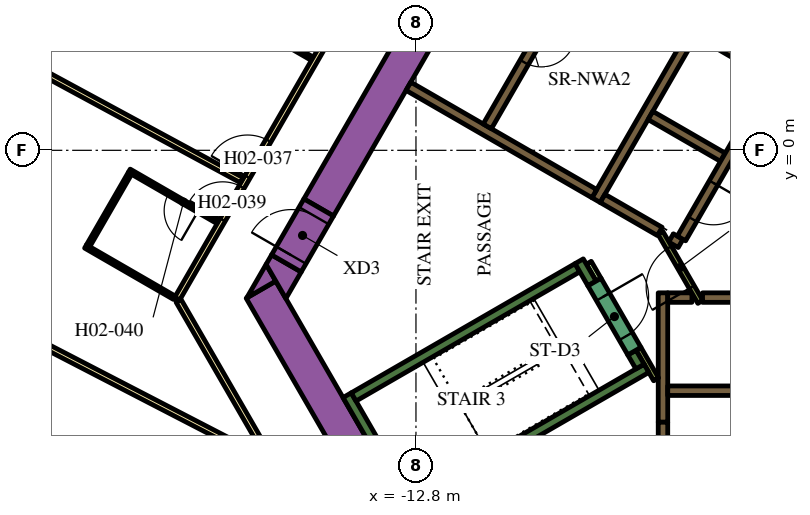
"""IFC4 building model, lengths in metres.
Left out: names, types, materials, properties, quantities, classifications, styles, units other than length and angle.
Written with IfcOpenShell. Run it as: python <this file> out.ifc"""

import sys

from ifc_helpers import new_model, si_unit, direction, frame, frame_2d, origin, place, context, subcontext, project, spatial, polyline, rectangle, outline, extrude, element, fill, save


model = new_model("IFC4")
c1 = context("Model", 3, precision=1e-05, world=origin(), true_north=direction((0.0, 1.0)))
c2 = subcontext(c1, "Body", "Model", "MODEL_VIEW")
j1 = project(units=[si_unit("LENGTHUNIT", "METRE"), si_unit("PLANEANGLEUNIT", "RADIAN")], contexts=[c1])
p1 = place(None, origin())
s1 = spatial("IfcSite", under=j1, at=p1, CompositionType="ELEMENT")
p2 = place(p1, origin())
s2 = spatial("IfcBuilding", under=s1, at=p2, CompositionType="ELEMENT")
p3 = place(p2, frame((0.0, 0.0, 43.2)))
s3 = spatial("IfcBuildingStorey", under=s2, at=p3, CompositionType="ELEMENT", Elevation=43.2)
p4 = place(p3, frame((-15.36, -1.503, 0.0), z_axis=(0.0, 0.0, 1.0), x_axis=(0.50000389221, 0.866023156604, 0.0)))
e1 = element("IfcWall", 1, at=p4, inside=s3, PredefinedType="SOLIDWALL", context=c2, shape_type="SweptSolid", body=[
    extrude(rectangle(XDim=21.0, YDim=0.9, at=frame_2d((10.5, 0.0))), origin(), (0.0, 0.0, 1.0), 3.9),
])
p5 = place(p3, frame((-12.134, -11.883, 0.0), z_axis=(0.0, 0.0, 1.0), x_axis=(-0.500005339912, 0.866022320763, 0.0)))
e2 = element("IfcWall", 2, at=p5, inside=s3, PredefinedType="SOLIDWALL", context=c2, shape_type="SweptSolid", body=[
    extrude(rectangle(XDim=9.488, YDim=0.9, at=frame_2d((4.744, 0.0))), origin(), (0.0, 0.0, 1.0), 3.9),
])
p6 = place(p3, origin())
e3 = element("IfcWall", 3, at=p6, inside=s3, PredefinedType="SOLIDWALL", context=c2, shape_type="SweptSolid", body=[
    extrude(outline(polyline([(-16.489, -3.44), (-17.251, -3.88), (-16.743, -3.0), (-16.489, -3.44)])), origin(), (0.0, 0.0, 1.0), 3.9),
])
e4 = element("IfcWall", 4, at=p6, inside=s3, PredefinedType="SOLIDWALL", context=c2, shape_type="SweptSolid", body=[
    extrude(outline(polyline([(-15.82, -3.201), (-16.223, -3.9), (-16.743, -3.0), (-16.599, -2.751), (-15.82, -3.201)])), origin(), (0.0, 0.0, 1.0), 3.9),
])
p7 = place(p3, frame((-12.885, -9.431, 0.0), z_axis=(0.0, 0.0, 1.0), x_axis=(-0.500020560727, 0.866013532718, 0.0)))
e5 = element("IfcWall", 5, at=p7, inside=s3, PredefinedType="SOLIDWALL", context=c2, shape_type="SweptSolid", body=[
    extrude(rectangle(XDim=3.45, YDim=0.25, at=frame_2d((1.725, 0.0))), origin(), (0.0, 0.0, 1.0), 3.9),
])
p8 = place(p3, frame((-14.44, -6.49, 0.0), z_axis=(0.0, 0.0, 1.0), x_axis=(0.866022966069, 0.500004222222, 0.0)))
e6 = element("IfcWall", 6, at=p8, inside=s3, PredefinedType="SOLIDWALL", context=c2, shape_type="SweptSolid", body=[
    extrude(rectangle(XDim=6.8, YDim=0.25, at=frame_2d((3.4, 0.0))), origin(), (0.0, 0.0, 1.0), 3.9),
])
p9 = place(p3, frame((-8.168, -3.503, 0.0), z_axis=(0.0, 0.0, 1.0), x_axis=(-0.499952099219, 0.866053057547, 0.0)))
e7 = element("IfcWall", 7, at=p9, inside=s3, PredefinedType="SOLIDWALL", context=c2, shape_type="SweptSolid", body=[
    extrude(rectangle(XDim=0.675, YDim=0.25, at=frame_2d((0.337, 0.0))), origin(), (0.0, 0.0, 1.0), 3.9),
])
p10 = place(p3, frame((-12.84, -9.261, 0.0), z_axis=(0.0, 0.0, 1.0), x_axis=(0.866016039709, 0.500016218704, 0.0)))
e8 = element("IfcWall", 8, at=p10, inside=s3, PredefinedType="SOLIDWALL", context=c2, shape_type="SweptSolid", body=[
    extrude(rectangle(XDim=7.05, YDim=0.25, at=frame_2d((3.525, 0.0))), origin(), (0.0, 0.0, 1.0), 3.9),
])
p11 = place(p3, frame((-6.905, -5.69, 0.0), z_axis=(0.0, 0.0, 1.0), x_axis=(-0.500402024738, 0.865793170242, 0.0)))
e9 = element("IfcWall", 9, at=p11, inside=s3, PredefinedType="SOLIDWALL", context=c2, shape_type="SweptSolid", body=[
    extrude(rectangle(XDim=0.425, YDim=0.25, at=frame_2d((0.212, 0.0))), origin(), (0.0, 0.0, 1.0), 3.9),
])
p12 = place(p3, frame((-5.259, -3.875, 0.0), z_axis=(0.0, 0.0, 1.0), x_axis=(1.0, 0.0, 0.0)))
e10 = element("IfcWall", 10, at=p12, inside=s3, PredefinedType="SOLIDWALL", context=c2, shape_type="SweptSolid", body=[
    extrude(rectangle(XDim=10.489, YDim=0.25, at=frame_2d((5.244, 0.0))), origin(), (0.0, 0.0, 1.0), 3.9),
])
p13 = place(p3, frame((-6.3, -3.75, 0.0), z_axis=(0.0, 0.0, 1.0), x_axis=(0.0, -1.0, 0.0)))
e11 = element("IfcWall", 11, at=p13, inside=s3, PredefinedType="SOLIDWALL", context=c2, shape_type="SweptSolid", body=[
    extrude(rectangle(XDim=3.404, YDim=0.25, at=frame_2d((1.702, 0.0))), origin(), (0.0, 0.0, 1.0), 3.9),
])
p14 = place(p3, frame((-6.175, -3.875, 0.0), z_axis=(0.0, 0.0, 1.0), x_axis=(1.0, 0.0, 0.0)))
e12 = element("IfcWall", 12, at=p14, inside=s3, PredefinedType="SOLIDWALL", context=c2, shape_type="SweptSolid", body=[
    extrude(rectangle(XDim=0.637, YDim=0.25, at=frame_2d((0.318, 0.0))), origin(), (0.0, 0.0, 1.0), 3.9),
])
p15 = place(p3, frame((-8.06, -1.311, 0.0), z_axis=(0.0, 0.0, 1.0), x_axis=(0.50000273126, 0.866023826885, 0.0)))
e13 = element("IfcWall", 13, at=p15, inside=s3, PredefinedType="SOLIDWALL", context=c2, shape_type="SweptSolid", body=[
    extrude(rectangle(XDim=10.33, YDim=0.25, at=frame_2d((5.165, 0.0))), origin(), (0.0, 0.0, 1.0), 3.9),
])
for number, where, z_axis, x_axis in (
    (14, (-5.369, 3.1, 0.0), (0.0, 0.0, 1.0), (0.866, -0.5, 0.0)),
    (15, (-4.724, -0.182, 0.0), (0.0, 0.0, 1.0), (-0.866, 0.5, 0.0)),
):
    element("IfcWall", number, at=place(p3, frame(where, z_axis=z_axis, x_axis=x_axis)), inside=s3, PredefinedType="SOLIDWALL", context=c2, shape_type="SweptSolid", body=[
        extrude(rectangle(XDim=2.2, YDim=0.25, at=frame_2d((1.1, 0.0))), origin(), (0.0, 0.0, 1.0), 3.9),
    ])
p16 = place(p3, frame((-6.088, -2.305, 0.0), z_axis=(0.0, 0.0, 1.0), x_axis=(0.866059450854, -0.499941024108, 0.0)))
e16 = element("IfcWall", 16, at=p16, inside=s3, PredefinedType="SOLIDWALL", context=c2, shape_type="SweptSolid", body=[
    extrude(rectangle(XDim=0.29, YDim=0.25, at=frame_2d((0.145, 0.0))), origin(), (0.0, 0.0, 1.0), 3.9),
])
p17 = place(p3, frame((-7.889, -1.265, 0.0), z_axis=(0.0, 0.0, 1.0), x_axis=(0.865986741702, -0.500066958712, 0.0)))
e17 = element("IfcWall", 17, at=p17, inside=s3, PredefinedType="SOLIDWALL", context=c2, shape_type="SweptSolid", body=[
    extrude(rectangle(XDim=1.738, YDim=0.25, at=frame_2d((0.869, 0.0))), origin(), (0.0, 0.0, 1.0), 3.9),
])
p18 = place(p3, frame((-8.106, -1.14, 0.0), z_axis=(0.0, 0.0, 1.0), x_axis=(-0.866000643155, 0.500042884217, 0.0)))
e18 = element("IfcWall", 18, at=p18, inside=s3, PredefinedType="SOLIDWALL", context=c2, shape_type="SweptSolid", body=[
    extrude(rectangle(XDim=5.65, YDim=0.25, at=frame_2d((2.825, 0.0))), origin(), (0.0, 0.0, 1.0), 3.9),
])
p19 = place(p3, frame((-6.48, -6.027, 0.0), z_axis=(0.0, 0.0, 1.0), x_axis=(-0.499927229454, 0.866067413802, 0.0)))
e19 = element("IfcWall", 19, at=p19, inside=s3, PredefinedType="PARTITIONING", context=c2, shape_type="SweptSolid", body=[
    extrude(rectangle(XDim=0.929, YDim=0.15, at=frame_2d((0.464, 0.0))), origin(), (0.0, 0.0, 1.0), 3.9),
])
p20 = place(p3, frame((-8.252, -2.958, 0.0), z_axis=(0.0, 0.0, 1.0), x_axis=(0.500174715838, -0.865924508047, 0.0)))
e20 = element("IfcWall", 20, at=p20, inside=s3, PredefinedType="PARTITIONING", context=c2, shape_type="SweptSolid", body=[
    extrude(rectangle(XDim=0.514, YDim=0.15, at=frame_2d((0.257, 0.0))), origin(), (0.0, 0.0, 1.0), 2.75),
])
p21 = place(p3, frame((-6.175, -6.325, 0.0), z_axis=(0.0, 0.0, 1.0), x_axis=(1.0, 0.0, 0.0)))
e21 = element("IfcWall", 21, at=p21, inside=s3, PredefinedType="SOLIDWALL", context=c2, shape_type="SweptSolid", body=[
    extrude(rectangle(XDim=12.35, YDim=0.25, at=frame_2d((6.175, 0.0))), origin(), (0.0, 0.0, 1.0), 3.9),
])
p22 = place(p21, frame((3.205, 0.0, 0.0)))
e22 = element("IfcOpeningElement", 22, at=p22, cuts=e21, PredefinedType="OPENING", context=c2, shape_type="SweptSolid", body=[
    extrude(rectangle(XDim=0.9, YDim=2.1, at=frame_2d((0.45, 1.05))), frame((0.0, 0.135, 0.0), z_axis=(0.0, -1.0, 0.0), x_axis=(1.0, 0.0, 0.0)), (0.0, 0.0, 1.0), 0.27),
])
p23 = place(p21, frame((8.145, 0.0, 0.0)))
e23 = element("IfcOpeningElement", 23, at=p23, cuts=e21, PredefinedType="OPENING", context=c2, shape_type="SweptSolid", body=[
    extrude(rectangle(XDim=1.1, YDim=2.1, at=frame_2d((0.55, 1.05))), frame((0.0, 0.135, 0.0), z_axis=(0.0, -1.0, 0.0), x_axis=(1.0, 0.0, 0.0)), (0.0, 0.0, 1.0), 0.27),
])
p24 = place(p21, frame((10.665, 0.0, 0.0)))
e24 = element("IfcOpeningElement", 24, at=p24, cuts=e21, PredefinedType="OPENING", context=c2, shape_type="SweptSolid", body=[
    extrude(rectangle(XDim=1.1, YDim=2.1, at=frame_2d((0.55, 1.05))), frame((0.0, 0.135, 0.0), z_axis=(0.0, -1.0, 0.0), x_axis=(1.0, 0.0, 0.0)), (0.0, 0.0, 1.0), 0.27),
])
p25 = place(p3, frame((-6.008, 9.144, 0.0), z_axis=(0.0, 0.0, 1.0), x_axis=(-0.500006956611, -0.866021387346, 0.0)))
e25 = element("IfcWall", 25, at=p25, inside=s3, PredefinedType="SOLIDWALL", context=c2, shape_type="SweptSolid", body=[
    extrude(rectangle(XDim=9.83, YDim=0.25, at=frame_2d((4.915, 0.0))), origin(), (0.0, 0.0, 1.0), 3.9),
])
p26 = place(p25, frame((6.985, 0.0, 0.0)))
e26 = element("IfcOpeningElement", 26, at=p26, cuts=e25, PredefinedType="OPENING", context=c2, shape_type="SweptSolid", body=[
    extrude(rectangle(XDim=0.9, YDim=2.1, at=frame_2d((0.45, 1.05))), frame((0.0, 0.135, 0.0), z_axis=(0.0, -1.0, 0.0), x_axis=(1.0, 0.0, 0.0)), (0.0, 0.0, 1.0), 0.27),
])
p27 = place(p3, frame((-0.898, 6.194, 0.0), z_axis=(0.0, 0.0, 1.0), x_axis=(-0.499996202215, -0.866027596426, 0.0)))
e27 = element("IfcWall", 27, at=p27, inside=s3, PredefinedType="SOLIDWALL", context=c2, shape_type="SweptSolid", body=[
    extrude(rectangle(XDim=9.83, YDim=0.25, at=frame_2d((4.915, 0.0))), origin(), (0.0, 0.0, 1.0), 3.9),
])
p28 = place(p27, frame((0.585, 0.0, 0.0)))
e28 = element("IfcOpeningElement", 28, at=p28, cuts=e27, PredefinedType="OPENING", context=c2, shape_type="SweptSolid", body=[
    extrude(rectangle(XDim=1.1, YDim=2.1, at=frame_2d((0.55, 1.05))), frame((0.0, 0.135, 0.0), z_axis=(0.0, -1.0, 0.0), x_axis=(1.0, 0.0, 0.0)), (0.0, 0.0, 1.0), 0.27),
])
p29 = place(p27, frame((3.105, 0.0, 0.0)))
e29 = element("IfcOpeningElement", 29, at=p29, cuts=e27, PredefinedType="OPENING", context=c2, shape_type="SweptSolid", body=[
    extrude(rectangle(XDim=1.1, YDim=2.1, at=frame_2d((0.55, 1.05))), frame((0.0, 0.135, 0.0), z_axis=(0.0, -1.0, 0.0), x_axis=(1.0, 0.0, 0.0)), (0.0, 0.0, 1.0), 0.27),
])
p30 = place(p27, frame((5.625, 0.0, 0.0)))
e30 = element("IfcOpeningElement", 30, at=p30, cuts=e27, PredefinedType="OPENING", context=c2, shape_type="SweptSolid", body=[
    extrude(rectangle(XDim=1.1, YDim=2.1, at=frame_2d((0.55, 1.05))), frame((0.0, 0.135, 0.0), z_axis=(0.0, -1.0, 0.0), x_axis=(1.0, 0.0, 0.0)), (0.0, 0.0, 1.0), 0.27),
])
p31 = place(p27, frame((8.145, 0.0, 0.0)))
e31 = element("IfcOpeningElement", 31, at=p31, cuts=e27, PredefinedType="OPENING", context=c2, shape_type="SweptSolid", body=[
    extrude(rectangle(XDim=1.1, YDim=2.1, at=frame_2d((0.55, 1.05))), frame((0.0, 0.135, 0.0), z_axis=(0.0, -1.0, 0.0), x_axis=(1.0, 0.0, 0.0)), (0.0, 0.0, 1.0), 0.27),
])
p32 = place(p3, frame((-8.103, -3.466, 0.0), z_axis=(0.0, 0.0, 1.0), x_axis=(0.500078061341, -0.865980330357, 0.0)))
e32 = element("IfcWall", 32, at=p32, inside=s3, PredefinedType="SOLIDWALL", context=c2, shape_type="SweptSolid", body=[
    extrude(rectangle(XDim=2.1, YDim=0.4, at=frame_2d((1.05, 0.0))), origin(), (0.0, 0.0, 1.0), 3.9),
])
p33 = place(p32, frame((0.45, 0.0, 0.0)))
e33 = element("IfcOpeningElement", 33, at=p33, cuts=e32, PredefinedType="OPENING", context=c2, shape_type="SweptSolid", body=[
    extrude(rectangle(XDim=1.2, YDim=2.1, at=frame_2d((0.6, 1.05))), frame((0.0, 0.21, 0.0), z_axis=(0.0, -1.0, 0.0), x_axis=(1.0, 0.0, 0.0)), (0.0, 0.0, 1.0), 0.42),
])
p34 = place(p3, frame((-6.3, -7.154, 0.0), z_axis=(0.0, 0.0, 1.0), x_axis=(0.0, -1.0, 0.0)))
e34 = element("IfcWall", 34, at=p34, inside=s3, PredefinedType="SOLIDWALL", context=c2, shape_type="SweptSolid", body=[
    extrude(rectangle(XDim=1.8, YDim=0.25, at=frame_2d((0.9, 0.0))), origin(), (0.0, 0.0, 1.0), 3.9),
])
p35 = place(p34, frame((0.45, 0.0, 0.0)))
e35 = element("IfcOpeningElement", 35, at=p35, cuts=e34, PredefinedType="OPENING", context=c2, shape_type="SweptSolid", body=[
    extrude(rectangle(XDim=0.9, YDim=2.1, at=frame_2d((0.45, 1.05))), frame((0.0, 0.135, 0.0), z_axis=(0.0, -1.0, 0.0), x_axis=(1.0, 0.0, 0.0)), (0.0, 0.0, 1.0), 0.27),
])
p36 = place(p3, frame((-5.317, -3.99, 0.0), z_axis=(0.0, 0.0, 1.0), x_axis=(-0.500027713859, 0.866009402589, 0.0)))
e36 = element("IfcWall", 36, at=p36, inside=s3, PredefinedType="PARTITIONING", context=c2, shape_type="SweptSolid", body=[
    extrude(rectangle(XDim=2.1, YDim=0.15, at=frame_2d((1.05, 0.0))), origin(), (0.0, 0.0, 1.0), 3.9),
])
p37 = place(p36, frame((0.45, 0.0, 0.0)))
e37 = element("IfcOpeningElement", 37, at=p37, cuts=e36, PredefinedType="OPENING", context=c2, shape_type="SweptSolid", body=[
    extrude(rectangle(XDim=1.2, YDim=2.1, at=frame_2d((0.6, 1.05))), frame((0.0, 0.085, 0.0), z_axis=(0.0, -1.0, 0.0), x_axis=(1.0, 0.0, 0.0)), (0.0, 0.0, 1.0), 0.17),
])
p38 = place(p3, frame((-16.209, -2.976, 0.0), z_axis=(0.0, 0.0, 1.0), x_axis=(0.499954529098, 0.86605165483, 0.0)))
e38 = element("IfcWall", 38, at=p38, inside=s3, PredefinedType="SOLIDWALL", context=c2, shape_type="SweptSolid", body=[
    extrude(rectangle(XDim=1.7, YDim=0.9, at=frame_2d((0.85, 0.0))), origin(), (0.0, 0.0, 1.0), 3.9),
])
p39 = place(p38, frame((0.25, 0.0, 0.0)))
e39 = element("IfcOpeningElement", 39, at=p39, cuts=e38, PredefinedType="OPENING", context=c2, shape_type="SweptSolid", body=[
    extrude(rectangle(XDim=1.2, YDim=2.1, at=frame_2d((0.6, 1.05))), frame((0.0, 0.46, 0.0), z_axis=(0.0, -1.0, 0.0), x_axis=(1.0, 0.0, 0.0)), (0.0, 0.0, 1.0), 0.92),
])
p40 = place(p3, frame((-19.081, -3.9, 0.0), z_axis=(0.0, 0.0, 1.0), x_axis=(0.499998313975, 0.866026377209, 0.0)))
e40 = element("IfcWall", 40, at=p40, inside=s3, PredefinedType="PARTITIONING", context=c2, shape_type="SweptSolid", body=[
    extrude(rectangle(XDim=25.766, YDim=0.15, at=frame_2d((12.883, 0.0))), origin(), (0.0, 0.0, 1.0), 2.75),
])
p41 = place(p40, frame((16.196, 0.0, 0.0)))
e41 = element("IfcOpeningElement", 41, at=p41, cuts=e40, PredefinedType="OPENING", context=c2, shape_type="SweptSolid", body=[
    extrude(rectangle(XDim=1.0, YDim=2.1, at=frame_2d((0.5, 1.05))), frame((0.0, 0.085, 0.0), z_axis=(0.0, -1.0, 0.0), x_axis=(1.0, 0.0, 0.0)), (0.0, 0.0, 1.0), 0.17),
])
p42 = place(p40, frame((14.889, 0.0, 0.0)))
e42 = element("IfcOpeningElement", 42, at=p42, cuts=e40, PredefinedType="OPENING", context=c2, shape_type="SweptSolid", body=[
    extrude(rectangle(XDim=1.0, YDim=2.1, at=frame_2d((0.5, 1.05))), frame((0.0, 0.085, 0.0), z_axis=(0.0, -1.0, 0.0), x_axis=(1.0, 0.0, 0.0)), (0.0, 0.0, 1.0), 0.17),
])
p43 = place(p40, frame((3.698, 0.0, 0.0)))
e43 = element("IfcOpeningElement", 43, at=p43, cuts=e40, PredefinedType="OPENING", context=c2, shape_type="SweptSolid", body=[
    extrude(rectangle(XDim=1.1, YDim=2.1, at=frame_2d((0.55, 1.05))), frame((0.0, 0.085, 0.0), z_axis=(0.0, -1.0, 0.0), x_axis=(1.0, 0.0, 0.0)), (0.0, 0.0, 1.0), 0.17),
])
p44 = place(p40, frame((2.392, 0.0, 0.0)))
e44 = element("IfcOpeningElement", 44, at=p44, cuts=e40, PredefinedType="OPENING", context=c2, shape_type="SweptSolid", body=[
    extrude(rectangle(XDim=1.0, YDim=2.1, at=frame_2d((0.5, 1.05))), frame((0.0, 0.085, 0.0), z_axis=(0.0, -1.0, 0.0), x_axis=(1.0, 0.0, 0.0)), (0.0, 0.0, 1.0), 0.17),
])
p45 = place(p3, frame((-16.412, -8.523, 0.0), z_axis=(0.0, 0.0, 1.0), x_axis=(-0.500001929737, 0.866024289647, 0.0)))
e45 = element("IfcWall", 45, at=p45, inside=s3, PredefinedType="PARTITIONING", context=c2, shape_type="SweptSolid", body=[
    extrude(rectangle(XDim=5.268, YDim=0.15, at=frame_2d((2.634, 0.0))), origin(), (0.0, 0.0, 1.0), 2.75),
])
p46 = place(p3, frame((-29.12, -5.356, 0.0), z_axis=(0.0, 0.0, 1.0), x_axis=(0.892401965553, -0.451241323327, 0.0)))
e46 = element("IfcWall", 46, at=p46, inside=s3, PredefinedType="PARTITIONING", context=c2, shape_type="SweptSolid", body=[
    extrude(rectangle(XDim=10.729, YDim=0.15, at=frame_2d((5.364, 0.0))), origin(), (0.0, 0.0, 1.0), 2.75),
])
p47 = place(p3, frame((-24.145, 2.871, 0.0), z_axis=(0.0, 0.0, 1.0), x_axis=(0.879551725039, -0.475803281809, 0.0)))
e47 = element("IfcWall", 47, at=p47, inside=s3, PredefinedType="PARTITIONING", context=c2, shape_type="SweptSolid", body=[
    extrude(rectangle(XDim=7.688, YDim=0.15, at=frame_2d((3.844, 0.0))), origin(), (0.0, 0.0, 1.0), 2.75),
])
p48 = place(p3, frame((-27.134, -2.779, 0.0), z_axis=(0.0, 0.0, 1.0), x_axis=(0.8882049501, -0.459447457951, 0.0)))
e48 = element("IfcWall", 48, at=p48, inside=s3, PredefinedType="PARTITIONING", context=c2, shape_type="SweptSolid", body=[
    extrude(rectangle(XDim=11.638, YDim=0.15, at=frame_2d((5.819, 0.0))), origin(), (0.0, 0.0, 1.0), 2.75),
])
p49 = place(p3, frame((-17.951, 3.808, 0.0), z_axis=(0.0, 0.0, 1.0), x_axis=(0.866034573852, -0.49998411664, 0.0)))
e49 = element("IfcWall", 49, at=p49, inside=s3, PredefinedType="PARTITIONING", context=c2, shape_type="SweptSolid", body=[
    extrude(rectangle(XDim=2.8, YDim=0.1, at=frame_2d((1.4, 0.0))), origin(), (0.0, 0.0, 1.0), 2.75),
])
p50 = place(p49, frame((1.25, 0.0, 0.0)))
e50 = element("IfcOpeningElement", 50, at=p50, cuts=e49, PredefinedType="OPENING", context=c2, shape_type="SweptSolid", body=[
    extrude(rectangle(XDim=1.0, YDim=2.1, at=frame_2d((0.5, 1.05))), frame((0.0, 0.06, 0.0), z_axis=(0.0, -1.0, 0.0), x_axis=(1.0, 0.0, 0.0)), (0.0, 0.0, 1.0), 0.12),
])
p51 = place(p3, frame((-18.006, -1.888, 0.0), z_axis=(0.0, 0.0, 1.0), x_axis=(-0.866036505625, 0.499980770555, 0.0)))
e51 = element("IfcWall", 51, at=p51, inside=s3, PredefinedType="PARTITIONING", context=c2, shape_type="SweptSolid", body=[
    extrude(rectangle(XDim=2.7, YDim=0.1, at=frame_2d((1.35, 0.0))), origin(), (0.0, 0.0, 1.0), 2.75),
])
p52 = place(p51, frame((0.6, 0.0, 0.0)))
e52 = element("IfcOpeningElement", 52, at=p52, cuts=e51, PredefinedType="OPENING", context=c2, shape_type="SweptSolid", body=[
    extrude(rectangle(XDim=0.9, YDim=2.1, at=frame_2d((0.45, 1.05))), frame((0.0, 0.06, 0.0), z_axis=(0.0, -1.0, 0.0), x_axis=(1.0, 0.0, 0.0)), (0.0, 0.0, 1.0), 0.12),
])
p53 = place(p3, frame((-20.326, -0.606, 0.0), z_axis=(0.0, 0.0, 1.0), x_axis=(-0.499946605688, -0.86605622881, 0.0)))
e53 = element("IfcWall", 53, at=p53, inside=s3, PredefinedType="PARTITIONING", context=c2, shape_type="SweptSolid", body=[
    extrude(rectangle(XDim=2.2, YDim=0.1, at=frame_2d((1.1, 0.0))), origin(), (0.0, 0.0, 1.0), 2.75),
])
p54 = place(p3, frame((-19.156, -3.88, 0.0), z_axis=(0.0, 0.0, 1.0), x_axis=(-0.86599734893, 0.500048589285, 0.0)))
e54 = element("IfcWall", 54, at=p54, inside=s3, PredefinedType="PARTITIONING", context=c2, shape_type="SweptSolid", body=[
    extrude(rectangle(XDim=2.7, YDim=0.1, at=frame_2d((1.35, 0.0))), origin(), (0.0, 0.0, 1.0), 2.75),
])
p55 = place(p26, origin())
e55 = element("IfcDoor", 55, at=p55, inside=s3, OperationType="SINGLE_SWING_LEFT", PredefinedType="DOOR", context=c2, shape_type="SweptSolid", body=[
    extrude(rectangle(XDim=0.9, YDim=2.1, at=frame_2d((0.45, 1.05))), frame((0.0, 0.025, 0.0), z_axis=(0.0, -1.0, 0.0), x_axis=(1.0, 0.0, 0.0)), (0.0, 0.0, 1.0), 0.05),
])
fill(e26, e55)
p56 = place(p31, origin())
e56 = element("IfcDoor", 56, at=p56, inside=s3, OperationType="DOUBLE_DOOR_SLIDING", PredefinedType="DOOR", context=c2, shape_type="SweptSolid", body=[
    extrude(rectangle(XDim=1.1, YDim=2.1, at=frame_2d((0.55, 1.05))), frame((0.0, 0.025, 0.0), z_axis=(0.0, -1.0, 0.0), x_axis=(1.0, 0.0, 0.0)), (0.0, 0.0, 1.0), 0.05),
])
fill(e31, e56)
p57 = place(p33, origin())
e57 = element("IfcDoor", 57, at=p57, inside=s3, OperationType="SINGLE_SWING_LEFT", PredefinedType="DOOR", context=c2, shape_type="SweptSolid", body=[
    extrude(rectangle(XDim=1.2, YDim=2.1, at=frame_2d((0.6, 1.05))), frame((0.0, 0.025, 0.0), z_axis=(0.0, -1.0, 0.0), x_axis=(1.0, 0.0, 0.0)), (0.0, 0.0, 1.0), 0.05),
])
fill(e33, e57)
p58 = place(p37, origin())
e58 = element("IfcDoor", 58, at=p58, inside=s3, OperationType="SINGLE_SWING_LEFT", PredefinedType="DOOR", context=c2, shape_type="SweptSolid", body=[
    extrude(rectangle(XDim=1.2, YDim=2.1, at=frame_2d((0.6, 1.05))), frame((0.0, 0.025, 0.0), z_axis=(0.0, -1.0, 0.0), x_axis=(1.0, 0.0, 0.0)), (0.0, 0.0, 1.0), 0.05),
])
fill(e37, e58)
p59 = place(p39, origin())
e59 = element("IfcDoor", 59, at=p59, inside=s3, OperationType="SINGLE_SWING_LEFT", PredefinedType="DOOR", context=c2, shape_type="SweptSolid", body=[
    extrude(rectangle(XDim=1.2, YDim=2.1, at=frame_2d((0.6, 1.05))), frame((0.0, 0.025, 0.0), z_axis=(0.0, -1.0, 0.0), x_axis=(1.0, 0.0, 0.0)), (0.0, 0.0, 1.0), 0.05),
])
fill(e39, e59)
p60 = place(p43, origin())
e60 = element("IfcDoor", 60, at=p60, inside=s3, OperationType="SINGLE_SWING_LEFT", PredefinedType="DOOR", context=c2, shape_type="SweptSolid", body=[
    extrude(rectangle(XDim=1.1, YDim=2.1, at=frame_2d((0.55, 1.05))), frame((0.0, 0.025, 0.0), z_axis=(0.0, -1.0, 0.0), x_axis=(1.0, 0.0, 0.0)), (0.0, 0.0, 1.0), 0.05),
])
fill(e43, e60)
p61 = place(p44, origin())
e61 = element("IfcDoor", 61, at=p61, inside=s3, OperationType="SINGLE_SWING_RIGHT", PredefinedType="DOOR", context=c2, shape_type="SweptSolid", body=[
    extrude(rectangle(XDim=1.0, YDim=2.1, at=frame_2d((0.5, 1.05))), frame((0.0, 0.025, 0.0), z_axis=(0.0, -1.0, 0.0), x_axis=(1.0, 0.0, 0.0)), (0.0, 0.0, 1.0), 0.05),
])
fill(e44, e61)
p62 = place(p52, origin())
e62 = element("IfcDoor", 62, at=p62, inside=s3, OperationType="SINGLE_SWING_RIGHT", PredefinedType="DOOR", context=c2, shape_type="SweptSolid", body=[
    extrude(rectangle(XDim=0.9, YDim=2.1, at=frame_2d((0.45, 1.05))), frame((0.0, 0.025, 0.0), z_axis=(0.0, -1.0, 0.0), x_axis=(1.0, 0.0, 0.0)), (0.0, 0.0, 1.0), 0.05),
])
fill(e52, e62)
save(model, sys.argv[1])
